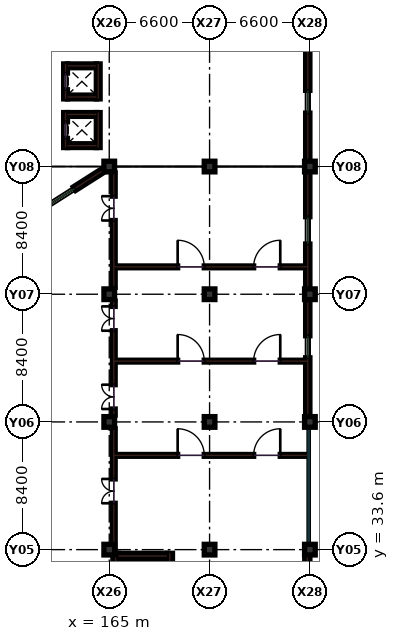
"""IFC4 building model, lengths in metres.
Left out: names, types, materials, properties, quantities, classifications, styles, units other than length and angle.
Written with IfcOpenShell. Run it as: python <this file> out.ifc"""

import sys

from ifc_helpers import new_model, si_unit, direction, frame, frame_2d, origin, origin_2d, place, context, subcontext, project, spatial, rectangle, extrude, element, fill, save


model = new_model("IFC4")
c1 = context("Model", 3, precision=1e-05, world=origin(), true_north=direction((0.0, 1.0)))
c2 = subcontext(c1, "Body", "Model", "MODEL_VIEW")
j1 = project(units=[si_unit("LENGTHUNIT", "METRE"), si_unit("PLANEANGLEUNIT", "RADIAN")], contexts=[c1])
p1 = place(None, origin())
s1 = spatial("IfcSite", under=j1, at=p1, CompositionType="ELEMENT")
p2 = place(p1, origin())
s2 = spatial("IfcBuilding", under=s1, at=p2, CompositionType="ELEMENT")
p3 = place(p2, frame((0.0, 0.0, 18.6)))
s3 = spatial("IfcBuildingStorey", under=s2, at=p3, CompositionType="ELEMENT", Elevation=18.6)
for number, where, z_axis, x_axis in (
    (1, (165.0, 33.6, 0.0), (0.0, 0.0, 1.0), (1.0, 0.0, 0.0)),
    (2, (165.0, 42.0, 0.0), (0.0, 0.0, 1.0), (1.0, 0.0, 0.0)),
    (3, (165.0, 50.4, 0.0), (0.0, 0.0, 1.0), (1.0, 0.0, 0.0)),
    (4, (165.0, 58.8, 0.0), (0.0, 0.0, 1.0), (1.0, 0.0, 0.0)),
    (5, (171.6, 33.6, 0.0), (0.0, 0.0, 1.0), (1.0, 0.0, 0.0)),
    (6, (171.6, 42.0, 0.0), (0.0, 0.0, 1.0), (1.0, 0.0, 0.0)),
    (7, (171.6, 50.4, 0.0), (0.0, 0.0, 1.0), (1.0, 0.0, 0.0)),
    (8, (171.6, 58.8, 0.0), (0.0, 0.0, 1.0), (1.0, 0.0, 0.0)),
    (9, (178.2, 33.6, 0.0), (0.0, 0.0, 1.0), (1.0, 0.0, 0.0)),
    (10, (178.2, 42.0, 0.0), (0.0, 0.0, 1.0), (1.0, 0.0, 0.0)),
    (11, (178.2, 50.4, 0.0), (0.0, 0.0, 1.0), (1.0, 0.0, 0.0)),
    (12, (178.2, 58.8, 0.0), (0.0, 0.0, 1.0), (1.0, 0.0, 0.0)),
):
    element("IfcColumn", number, at=place(p3, frame(where, z_axis=z_axis, x_axis=x_axis)), inside=s3, PredefinedType="COLUMN", context=c2, shape_type="SweptSolid", body=[
        extrude(rectangle(XDim=0.7, YDim=0.7, at=origin_2d()), origin(), (0.0, 0.0, 1.0), 4.2),
    ])
p4 = place(p3, frame((165.3, 33.65, 0.0), z_axis=(0.0, 0.0, 1.0), x_axis=(0.0, 1.0, 0.0)))
e13 = element("IfcWall", 13, at=p4, inside=s3, PredefinedType="SOLIDWALL", context=c2, shape_type="SweptSolid", body=[
    extrude(rectangle(XDim=7.9, YDim=0.18, at=frame_2d((3.95, 0.0))), origin(), (0.0, 0.0, 1.0), 3.19),
])
p5 = place(p4, frame((3.0, 0.0, 0.0)))
e14 = element("IfcOpeningElement", 14, at=p5, cuts=e13, PredefinedType="OPENING", context=c2, shape_type="SweptSolid", body=[
    extrude(rectangle(XDim=1.6, YDim=2.2, at=frame_2d((0.8, 1.1))), frame((0.0, 0.1, 0.0), z_axis=(0.0, -1.0, 0.0), x_axis=(1.0, 0.0, 0.0)), (0.0, 0.0, 1.0), 0.2),
])
p6 = place(p3, frame((165.3, 42.45, 0.0), z_axis=(0.0, 0.0, 1.0), x_axis=(0.0, 1.0, 0.0)))
e15 = element("IfcWall", 15, at=p6, inside=s3, PredefinedType="SOLIDWALL", context=c2, shape_type="SweptSolid", body=[
    extrude(rectangle(XDim=7.5, YDim=0.18, at=frame_2d((3.75, 0.0))), origin(), (0.0, 0.0, 1.0), 3.19),
])
p7 = place(p6, frame((0.4, 0.0, 0.0)))
e16 = element("IfcOpeningElement", 16, at=p7, cuts=e15, PredefinedType="OPENING", context=c2, shape_type="SweptSolid", body=[
    extrude(rectangle(XDim=1.6, YDim=2.2, at=frame_2d((0.8, 1.1))), frame((0.0, 0.1, 0.0), z_axis=(0.0, -1.0, 0.0), x_axis=(1.0, 0.0, 0.0)), (0.0, 0.0, 1.0), 0.2),
])
p8 = place(p6, frame((5.55, 0.0, 0.0)))
e17 = element("IfcOpeningElement", 17, at=p8, cuts=e15, PredefinedType="OPENING", context=c2, shape_type="SweptSolid", body=[
    extrude(rectangle(XDim=1.6, YDim=2.2, at=frame_2d((0.8, 1.1))), frame((0.0, 0.1, 0.0), z_axis=(0.0, -1.0, 0.0), x_axis=(1.0, 0.0, 0.0)), (0.0, 0.0, 1.0), 0.2),
])
p9 = place(p3, frame((165.3, 50.85, 0.0), z_axis=(0.0, 0.0, 1.0), x_axis=(0.0, 1.0, 0.0)))
e18 = element("IfcWall", 18, at=p9, inside=s3, PredefinedType="SOLIDWALL", context=c2, shape_type="SweptSolid", body=[
    extrude(rectangle(XDim=7.53, YDim=0.18, at=frame_2d((3.765, 0.0))), origin(), (0.0, 0.0, 1.0), 3.19),
])
p10 = place(p9, frame((4.4, 0.0, 0.0)))
e19 = element("IfcOpeningElement", 19, at=p10, cuts=e18, PredefinedType="OPENING", context=c2, shape_type="SweptSolid", body=[
    extrude(rectangle(XDim=1.6, YDim=2.2, at=frame_2d((0.8, 1.1))), frame((0.0, 0.1, 0.0), z_axis=(0.0, -1.0, 0.0), x_axis=(1.0, 0.0, 0.0)), (0.0, 0.0, 1.0), 0.2),
])
p11 = place(p3, frame((165.3, 39.8, 0.0), z_axis=(0.0, 0.0, 1.0), x_axis=(1.0, 0.0, 0.0)))
e20 = element("IfcWall", 20, at=p11, inside=s3, PredefinedType="PARTITIONING", context=c2, shape_type="SweptSolid", body=[
    extrude(rectangle(XDim=12.75, YDim=0.12, at=frame_2d((6.375, 0.0))), origin(), (0.0, 0.0, 1.0), 3.19),
])
p12 = place(p11, frame((4.2, 0.0, 0.0)))
e21 = element("IfcOpeningElement", 21, at=p12, cuts=e20, PredefinedType="OPENING", context=c2, shape_type="SweptSolid", body=[
    extrude(rectangle(XDim=1.75, YDim=2.3, at=frame_2d((0.875, 1.15))), frame((0.0, 0.07, 0.0), z_axis=(0.0, -1.0, 0.0), x_axis=(1.0, 0.0, 0.0)), (0.0, 0.0, 1.0), 0.14),
])
p13 = place(p11, frame((9.2, 0.0, 0.0)))
e22 = element("IfcOpeningElement", 22, at=p13, cuts=e20, PredefinedType="OPENING", context=c2, shape_type="SweptSolid", body=[
    extrude(rectangle(XDim=1.75, YDim=2.3, at=frame_2d((0.875, 1.15))), frame((0.0, 0.07, 0.0), z_axis=(0.0, -1.0, 0.0), x_axis=(1.0, 0.0, 0.0)), (0.0, 0.0, 1.0), 0.14),
])
p14 = place(p3, frame((165.3, 46.0, 0.0), z_axis=(0.0, 0.0, 1.0), x_axis=(1.0, 0.0, 0.0)))
e23 = element("IfcWall", 23, at=p14, inside=s3, PredefinedType="PARTITIONING", context=c2, shape_type="SweptSolid", body=[
    extrude(rectangle(XDim=12.75, YDim=0.12, at=frame_2d((6.375, 0.0))), origin(), (0.0, 0.0, 1.0), 3.19),
])
p15 = place(p14, frame((4.2, 0.0, 0.0)))
e24 = element("IfcOpeningElement", 24, at=p15, cuts=e23, PredefinedType="OPENING", context=c2, shape_type="SweptSolid", body=[
    extrude(rectangle(XDim=1.75, YDim=2.3, at=frame_2d((0.875, 1.15))), frame((0.0, 0.07, 0.0), z_axis=(0.0, -1.0, 0.0), x_axis=(1.0, 0.0, 0.0)), (0.0, 0.0, 1.0), 0.14),
])
p16 = place(p14, frame((9.2, 0.0, 0.0)))
e25 = element("IfcOpeningElement", 25, at=p16, cuts=e23, PredefinedType="OPENING", context=c2, shape_type="SweptSolid", body=[
    extrude(rectangle(XDim=1.75, YDim=2.3, at=frame_2d((0.875, 1.15))), frame((0.0, 0.07, 0.0), z_axis=(0.0, -1.0, 0.0), x_axis=(1.0, 0.0, 0.0)), (0.0, 0.0, 1.0), 0.14),
])
p17 = place(p3, frame((165.3, 52.2, 0.0), z_axis=(0.0, 0.0, 1.0), x_axis=(1.0, 0.0, 0.0)))
e26 = element("IfcWall", 26, at=p17, inside=s3, PredefinedType="PARTITIONING", context=c2, shape_type="SweptSolid", body=[
    extrude(rectangle(XDim=12.75, YDim=0.12, at=frame_2d((6.375, 0.0))), origin(), (0.0, 0.0, 1.0), 3.19),
])
p18 = place(p17, frame((4.2, 0.0, 0.0)))
e27 = element("IfcOpeningElement", 27, at=p18, cuts=e26, PredefinedType="OPENING", context=c2, shape_type="SweptSolid", body=[
    extrude(rectangle(XDim=1.75, YDim=2.3, at=frame_2d((0.875, 1.15))), frame((0.0, 0.07, 0.0), z_axis=(0.0, -1.0, 0.0), x_axis=(1.0, 0.0, 0.0)), (0.0, 0.0, 1.0), 0.14),
])
p19 = place(p17, frame((9.2, 0.0, 0.0)))
e28 = element("IfcOpeningElement", 28, at=p19, cuts=e26, PredefinedType="OPENING", context=c2, shape_type="SweptSolid", body=[
    extrude(rectangle(XDim=1.75, YDim=2.3, at=frame_2d((0.875, 1.15))), frame((0.0, 0.07, 0.0), z_axis=(0.0, -1.0, 0.0), x_axis=(1.0, 0.0, 0.0)), (0.0, 0.0, 1.0), 0.14),
])
p20 = place(p3, frame((178.03, 25.545, 0.0), z_axis=(0.0, 0.0, 1.0), x_axis=(0.0, 1.0, 0.0)))
e29 = element("IfcWall", 29, at=p20, inside=s3, PredefinedType="SHEAR", context=c2, shape_type="SweptSolid", body=[
    extrude(rectangle(XDim=7.71, YDim=0.34, at=frame_2d((3.855, 0.0))), origin(), (0.0, 0.0, 1.0), 3.94),
])
p21 = place(p3, frame((178.06, 42.345, 0.0), z_axis=(0.0, 0.0, 1.0), x_axis=(0.0, 1.0, 0.0)))
e30 = element("IfcWall", 30, at=p21, inside=s3, PredefinedType="SOLIDWALL", context=c2, shape_type="SweptSolid", body=[
    extrude(rectangle(XDim=7.71, YDim=0.28, at=frame_2d((3.855, 0.0))), origin(), (0.0, 0.0, 1.0), 3.325),
])
p22 = place(p21, frame((3.875, 0.0, 0.95)))
e31 = element("IfcOpeningElement", 31, at=p22, cuts=e30, PredefinedType="OPENING", context=c2, shape_type="SweptSolid", body=[
    extrude(rectangle(XDim=1.45, YDim=1.6, at=frame_2d((0.725, 0.8))), frame((0.0, 0.15, 0.0), z_axis=(0.0, -1.0, 0.0), x_axis=(1.0, 0.0, 0.0)), (0.0, 0.0, 1.0), 0.3),
])
p23 = place(p3, frame((178.06, 50.745, 0.0), z_axis=(0.0, 0.0, 1.0), x_axis=(0.0, 1.0, 0.0)))
e32 = element("IfcWall", 32, at=p23, inside=s3, PredefinedType="SOLIDWALL", context=c2, shape_type="SweptSolid", body=[
    extrude(rectangle(XDim=7.71, YDim=0.28, at=frame_2d((3.855, 0.0))), origin(), (0.0, 0.0, 1.0), 3.325),
])
p24 = place(p23, frame((2.955, 0.0, 0.95)))
e33 = element("IfcOpeningElement", 33, at=p24, cuts=e32, PredefinedType="OPENING", context=c2, shape_type="SweptSolid", body=[
    extrude(rectangle(XDim=1.8, YDim=1.6, at=frame_2d((0.9, 0.8))), frame((0.0, 0.15, 0.0), z_axis=(0.0, -1.0, 0.0), x_axis=(1.0, 0.0, 0.0)), (0.0, 0.0, 1.0), 0.3),
])
p25 = place(p3, frame((178.06, 59.145, 0.0), z_axis=(0.0, 0.0, 1.0), x_axis=(0.0, 1.0, 0.0)))
e34 = element("IfcWall", 34, at=p25, inside=s3, PredefinedType="SOLIDWALL", context=c2, shape_type="SweptSolid", body=[
    extrude(rectangle(XDim=7.835, YDim=0.28, at=frame_2d((3.917, 0.0))), origin(), (0.0, 0.0, 1.0), 3.325),
])
p26 = place(p25, frame((3.17, 0.0, 0.95)))
e35 = element("IfcOpeningElement", 35, at=p26, cuts=e34, PredefinedType="OPENING", context=c2, shape_type="SweptSolid", body=[
    extrude(rectangle(XDim=1.5, YDim=2.1, at=frame_2d((0.75, 1.05))), frame((0.0, 0.15, 0.0), z_axis=(0.0, -1.0, 0.0), x_axis=(1.0, 0.0, 0.0)), (0.0, 0.0, 1.0), 0.3),
])
p27 = place(p3, frame((158.65, 54.76, 0.0), z_axis=(0.0, 0.0, 1.0), x_axis=(0.843786613851, 0.536678814829, 0.0)))
e36 = element("IfcWall", 36, at=p27, inside=s3, PredefinedType="SOLIDWALL", context=c2, shape_type="SweptSolid", body=[
    extrude(rectangle(XDim=7.229, YDim=0.28, at=frame_2d((3.615, 0.0))), origin(), (0.0, 0.0, 1.0), 3.325),
])
p28 = place(p27, frame((2.415, 0.0, 0.95)))
e37 = element("IfcOpeningElement", 37, at=p28, cuts=e36, PredefinedType="OPENING", context=c2, shape_type="SweptSolid", body=[
    extrude(rectangle(XDim=2.4, YDim=1.6, at=frame_2d((1.2, 0.8))), frame((0.0, 0.15, 0.0), z_axis=(0.0, -1.0, 0.0), x_axis=(1.0, 0.0, 0.0)), (0.0, 0.0, 1.0), 0.3),
])
p29 = place(p3, frame((165.42, 25.19, 0.0), z_axis=(0.0, 0.0, 1.0), x_axis=(0.0, 1.0, 0.0)))
e38 = element("IfcWall", 38, at=p29, inside=s3, PredefinedType="SHEAR", context=c2, shape_type="SweptSolid", body=[
    extrude(rectangle(XDim=8.17, YDim=0.36, at=frame_2d((4.085, 0.0))), origin(), (0.0, 0.0, 1.0), 3.94),
])
p30 = place(p3, frame((168.98, 25.19, 0.0), z_axis=(0.0, 0.0, 1.0), x_axis=(0.0, 1.0, 0.0)))
e39 = element("IfcWall", 39, at=p30, inside=s3, PredefinedType="SHEAR", context=c2, shape_type="SweptSolid", body=[
    extrude(rectangle(XDim=8.17, YDim=0.36, at=frame_2d((4.085, 0.0))), origin(), (0.0, 0.0, 1.0), 3.94),
])
p31 = place(p30, frame((0.45, 0.0, 0.0)))
e40 = element("IfcOpeningElement", 40, at=p31, cuts=e39, PredefinedType="OPENING", context=c2, shape_type="SweptSolid", body=[
    extrude(rectangle(XDim=1.25, YDim=2.15, at=frame_2d((0.625, 1.075))), frame((0.0, 0.19, 0.0), z_axis=(0.0, -1.0, 0.0), x_axis=(1.0, 0.0, 0.0)), (0.0, 0.0, 1.0), 0.38),
])
p32 = place(p3, frame((165.6, 33.18, 0.0), z_axis=(0.0, 0.0, 1.0), x_axis=(1.0, 0.0, 0.0)))
e41 = element("IfcWall", 41, at=p32, inside=s3, PredefinedType="SHEAR", context=c2, shape_type="SweptSolid", body=[
    extrude(rectangle(XDim=3.2, YDim=0.36, at=frame_2d((1.6, 0.0))), origin(), (0.0, 0.0, 1.0), 3.94),
])
p33 = place(p3, frame((162.125, 60.05, 0.0), z_axis=(0.0, 0.0, 1.0), x_axis=(0.0, 1.0, 0.0)))
e42 = element("IfcWall", 42, at=p33, inside=s3, PredefinedType="SHEAR", context=c2, shape_type="SweptSolid", body=[
    extrude(rectangle(XDim=2.3, YDim=0.25, at=frame_2d((1.15, 0.0))), origin(), (0.0, 0.0, 1.0), 3.96),
])
p34 = place(p33, frame((0.6, 0.0, 0.0)))
e43 = element("IfcOpeningElement", 43, at=p34, cuts=e42, PredefinedType="OPENING", context=c2, shape_type="SweptSolid", body=[
    extrude(rectangle(XDim=1.1, YDim=2.15, at=frame_2d((0.55, 1.075))), frame((0.0, 0.135, 0.0), z_axis=(0.0, -1.0, 0.0), x_axis=(1.0, 0.0, 0.0)), (0.0, 0.0, 1.0), 0.27),
])
p35 = place(p3, frame((164.275, 60.05, 0.0), z_axis=(0.0, 0.0, 1.0), x_axis=(0.0, 1.0, 0.0)))
e44 = element("IfcWall", 44, at=p35, inside=s3, PredefinedType="SHEAR", context=c2, shape_type="SweptSolid", body=[
    extrude(rectangle(XDim=2.3, YDim=0.25, at=frame_2d((1.15, 0.0))), origin(), (0.0, 0.0, 1.0), 3.96),
])
for number, where, z_axis, x_axis in (
    (45, (162.25, 60.175, 0.0), (0.0, 0.0, 1.0), (1.0, 0.0, 0.0)),
    (46, (162.25, 62.225, 0.0), (0.0, 0.0, 1.0), (1.0, 0.0, 0.0)),
):
    element("IfcWall", number, at=place(p3, frame(where, z_axis=z_axis, x_axis=x_axis)), inside=s3, PredefinedType="SHEAR", context=c2, shape_type="SweptSolid", body=[
        extrude(rectangle(XDim=1.9, YDim=0.25, at=frame_2d((0.95, 0.0))), origin(), (0.0, 0.0, 1.0), 3.96),
    ])
p36 = place(p3, frame((162.125, 63.25, 0.0), z_axis=(0.0, 0.0, 1.0), x_axis=(0.0, 1.0, 0.0)))
e47 = element("IfcWall", 47, at=p36, inside=s3, PredefinedType="SHEAR", context=c2, shape_type="SweptSolid", body=[
    extrude(rectangle(XDim=2.3, YDim=0.25, at=frame_2d((1.15, 0.0))), origin(), (0.0, 0.0, 1.0), 3.96),
])
p37 = place(p36, frame((0.6, 0.0, 0.0)))
e48 = element("IfcOpeningElement", 48, at=p37, cuts=e47, PredefinedType="OPENING", context=c2, shape_type="SweptSolid", body=[
    extrude(rectangle(XDim=1.1, YDim=2.15, at=frame_2d((0.55, 1.075))), frame((0.0, 0.135, 0.0), z_axis=(0.0, -1.0, 0.0), x_axis=(1.0, 0.0, 0.0)), (0.0, 0.0, 1.0), 0.27),
])
p38 = place(p3, frame((164.275, 63.25, 0.0), z_axis=(0.0, 0.0, 1.0), x_axis=(0.0, 1.0, 0.0)))
e49 = element("IfcWall", 49, at=p38, inside=s3, PredefinedType="SHEAR", context=c2, shape_type="SweptSolid", body=[
    extrude(rectangle(XDim=2.3, YDim=0.25, at=frame_2d((1.15, 0.0))), origin(), (0.0, 0.0, 1.0), 3.96),
])
for number, where, z_axis, x_axis in (
    (50, (162.25, 63.375, 0.0), (0.0, 0.0, 1.0), (1.0, 0.0, 0.0)),
    (51, (162.25, 65.425, 0.0), (0.0, 0.0, 1.0), (1.0, 0.0, 0.0)),
):
    element("IfcWall", number, at=place(p3, frame(where, z_axis=z_axis, x_axis=x_axis)), inside=s3, PredefinedType="SHEAR", context=c2, shape_type="SweptSolid", body=[
        extrude(rectangle(XDim=1.9, YDim=0.25, at=frame_2d((0.95, 0.0))), origin(), (0.0, 0.0, 1.0), 3.96),
    ])
p39 = place(p5, origin())
e52 = element("IfcDoor", 52, at=p39, inside=s3, OperationType="DOUBLE_DOOR_SINGLE_SWING", PredefinedType="DOOR", context=c2, shape_type="SweptSolid", body=[
    extrude(rectangle(XDim=1.6, YDim=2.2, at=frame_2d((0.8, 1.1))), frame((0.0, 0.025, 0.0), z_axis=(0.0, -1.0, 0.0), x_axis=(1.0, 0.0, 0.0)), (0.0, 0.0, 1.0), 0.05),
])
fill(e14, e52)
p40 = place(p7, origin())
e53 = element("IfcDoor", 53, at=p40, inside=s3, OperationType="DOUBLE_DOOR_SINGLE_SWING", PredefinedType="DOOR", context=c2, shape_type="SweptSolid", body=[
    extrude(rectangle(XDim=1.6, YDim=2.2, at=frame_2d((0.8, 1.1))), frame((0.0, 0.025, 0.0), z_axis=(0.0, -1.0, 0.0), x_axis=(1.0, 0.0, 0.0)), (0.0, 0.0, 1.0), 0.05),
])
fill(e16, e53)
p41 = place(p8, origin())
e54 = element("IfcDoor", 54, at=p41, inside=s3, OperationType="DOUBLE_DOOR_SINGLE_SWING", PredefinedType="DOOR", context=c2, shape_type="SweptSolid", body=[
    extrude(rectangle(XDim=1.6, YDim=2.2, at=frame_2d((0.8, 1.1))), frame((0.0, 0.025, 0.0), z_axis=(0.0, -1.0, 0.0), x_axis=(1.0, 0.0, 0.0)), (0.0, 0.0, 1.0), 0.05),
])
fill(e17, e54)
p42 = place(p10, origin())
e55 = element("IfcDoor", 55, at=p42, inside=s3, OperationType="DOUBLE_DOOR_SINGLE_SWING", PredefinedType="DOOR", context=c2, shape_type="SweptSolid", body=[
    extrude(rectangle(XDim=1.6, YDim=2.2, at=frame_2d((0.8, 1.1))), frame((0.0, 0.025, 0.0), z_axis=(0.0, -1.0, 0.0), x_axis=(1.0, 0.0, 0.0)), (0.0, 0.0, 1.0), 0.05),
])
fill(e19, e55)
p43 = place(p12, origin())
e56 = element("IfcDoor", 56, at=p43, inside=s3, OperationType="SINGLE_SWING_LEFT", PredefinedType="DOOR", context=c2, shape_type="SweptSolid", body=[
    extrude(rectangle(XDim=1.75, YDim=2.3, at=frame_2d((0.875, 1.15))), frame((0.0, 0.025, 0.0), z_axis=(0.0, -1.0, 0.0), x_axis=(1.0, 0.0, 0.0)), (0.0, 0.0, 1.0), 0.05),
])
fill(e21, e56)
p44 = place(p13, origin())
e57 = element("IfcDoor", 57, at=p44, inside=s3, OperationType="SINGLE_SWING_RIGHT", PredefinedType="DOOR", context=c2, shape_type="SweptSolid", body=[
    extrude(rectangle(XDim=1.75, YDim=2.3, at=frame_2d((0.875, 1.15))), frame((0.0, 0.025, 0.0), z_axis=(0.0, -1.0, 0.0), x_axis=(1.0, 0.0, 0.0)), (0.0, 0.0, 1.0), 0.05),
])
fill(e22, e57)
p45 = place(p15, origin())
e58 = element("IfcDoor", 58, at=p45, inside=s3, OperationType="SINGLE_SWING_LEFT", PredefinedType="DOOR", context=c2, shape_type="SweptSolid", body=[
    extrude(rectangle(XDim=1.75, YDim=2.3, at=frame_2d((0.875, 1.15))), frame((0.0, 0.025, 0.0), z_axis=(0.0, -1.0, 0.0), x_axis=(1.0, 0.0, 0.0)), (0.0, 0.0, 1.0), 0.05),
])
fill(e24, e58)
p46 = place(p16, origin())
e59 = element("IfcDoor", 59, at=p46, inside=s3, OperationType="SINGLE_SWING_RIGHT", PredefinedType="DOOR", context=c2, shape_type="SweptSolid", body=[
    extrude(rectangle(XDim=1.75, YDim=2.3, at=frame_2d((0.875, 1.15))), frame((0.0, 0.025, 0.0), z_axis=(0.0, -1.0, 0.0), x_axis=(1.0, 0.0, 0.0)), (0.0, 0.0, 1.0), 0.05),
])
fill(e25, e59)
p47 = place(p18, origin())
e60 = element("IfcDoor", 60, at=p47, inside=s3, OperationType="SINGLE_SWING_LEFT", PredefinedType="DOOR", context=c2, shape_type="SweptSolid", body=[
    extrude(rectangle(XDim=1.75, YDim=2.3, at=frame_2d((0.875, 1.15))), frame((0.0, 0.025, 0.0), z_axis=(0.0, -1.0, 0.0), x_axis=(1.0, 0.0, 0.0)), (0.0, 0.0, 1.0), 0.05),
])
fill(e27, e60)
p48 = place(p19, origin())
e61 = element("IfcDoor", 61, at=p48, inside=s3, OperationType="SINGLE_SWING_RIGHT", PredefinedType="DOOR", context=c2, shape_type="SweptSolid", body=[
    extrude(rectangle(XDim=1.75, YDim=2.3, at=frame_2d((0.875, 1.15))), frame((0.0, 0.025, 0.0), z_axis=(0.0, -1.0, 0.0), x_axis=(1.0, 0.0, 0.0)), (0.0, 0.0, 1.0), 0.05),
])
fill(e28, e61)
p49 = place(p22, origin())
e62 = element("IfcWindow", 62, at=p49, inside=s3, PartitioningType="SINGLE_PANEL", PredefinedType="WINDOW", context=c2, shape_type="SweptSolid", body=[
    extrude(rectangle(XDim=1.45, YDim=1.6, at=frame_2d((0.725, 0.8))), frame((0.0, 0.03, 0.0), z_axis=(0.0, -1.0, 0.0), x_axis=(1.0, 0.0, 0.0)), (0.0, 0.0, 1.0), 0.06),
])
fill(e31, e62)
p50 = place(p24, origin())
e63 = element("IfcWindow", 63, at=p50, inside=s3, PartitioningType="SINGLE_PANEL", PredefinedType="WINDOW", context=c2, shape_type="SweptSolid", body=[
    extrude(rectangle(XDim=1.8, YDim=1.6, at=frame_2d((0.9, 0.8))), frame((0.0, 0.03, 0.0), z_axis=(0.0, -1.0, 0.0), x_axis=(1.0, 0.0, 0.0)), (0.0, 0.0, 1.0), 0.06),
])
fill(e33, e63)
p51 = place(p26, origin())
e64 = element("IfcWindow", 64, at=p51, inside=s3, PartitioningType="SINGLE_PANEL", PredefinedType="WINDOW", context=c2, shape_type="SweptSolid", body=[
    extrude(rectangle(XDim=1.5, YDim=2.1, at=frame_2d((0.75, 1.05))), frame((0.0, 0.03, 0.0), z_axis=(0.0, -1.0, 0.0), x_axis=(1.0, 0.0, 0.0)), (0.0, 0.0, 1.0), 0.06),
])
fill(e35, e64)
p52 = place(p28, origin())
e65 = element("IfcWindow", 65, at=p52, inside=s3, PartitioningType="SINGLE_PANEL", PredefinedType="WINDOW", context=c2, shape_type="SweptSolid", body=[
    extrude(rectangle(XDim=2.4, YDim=1.6, at=frame_2d((1.2, 0.8))), frame((0.0, 0.03, 0.0), z_axis=(0.0, -1.0, 0.0), x_axis=(1.0, 0.0, 0.0)), (0.0, 0.0, 1.0), 0.06),
])
fill(e37, e65)
p53 = place(p34, origin())
e66 = element("IfcDoor", 66, at=p53, inside=s3, OperationType="SLIDING_TO_LEFT", PredefinedType="DOOR", context=c2, shape_type="SweptSolid", body=[
    extrude(rectangle(XDim=1.1, YDim=2.15, at=frame_2d((0.55, 1.075))), frame((0.0, 0.025, 0.0), z_axis=(0.0, -1.0, 0.0), x_axis=(1.0, 0.0, 0.0)), (0.0, 0.0, 1.0), 0.05),
])
fill(e43, e66)
p54 = place(p37, origin())
e67 = element("IfcDoor", 67, at=p54, inside=s3, OperationType="SLIDING_TO_LEFT", PredefinedType="DOOR", context=c2, shape_type="SweptSolid", body=[
    extrude(rectangle(XDim=1.1, YDim=2.15, at=frame_2d((0.55, 1.075))), frame((0.0, 0.025, 0.0), z_axis=(0.0, -1.0, 0.0), x_axis=(1.0, 0.0, 0.0)), (0.0, 0.0, 1.0), 0.05),
])
fill(e48, e67)
save(model, sys.argv[1])
